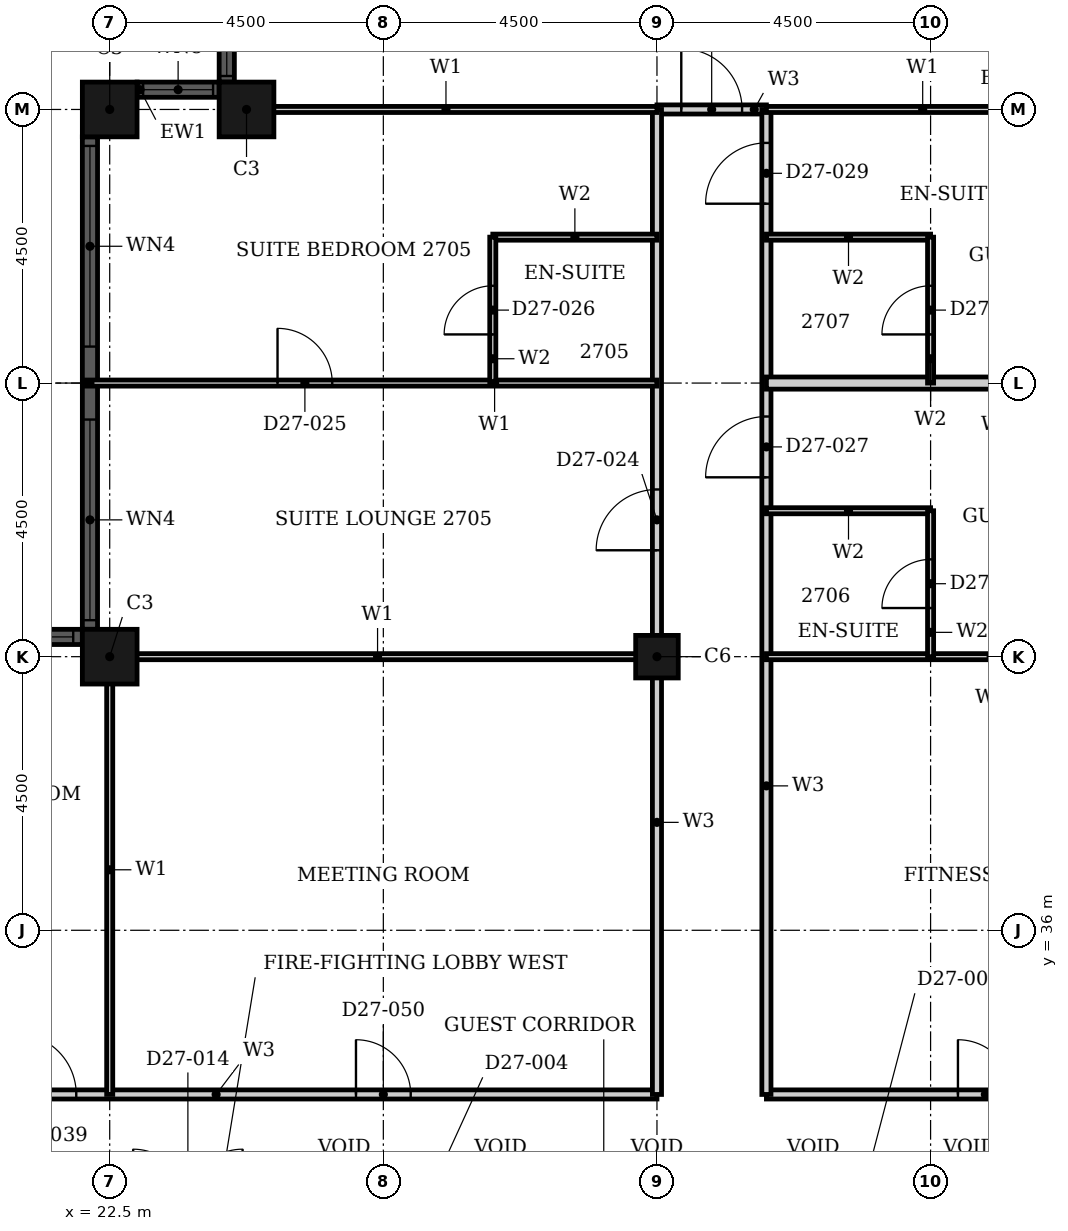
"""IFC4 building model, lengths in metres.
Left out: names, types, materials, properties, quantities, classifications, styles, units other than length and angle.
Written with IfcOpenShell. Run it as: python <this file> out.ifc"""

import sys

from ifc_helpers import new_model, si_unit, direction, frame, frame_2d, origin, origin_2d, place, context, subcontext, project, spatial, rectangle, hollow_rectangle, extrude, element, fill, save


model = new_model("IFC4")
c1 = context("Model", 3, precision=1e-05, world=origin(), true_north=direction((0.0, 1.0)))
c2 = subcontext(c1, "Body", "Model", "MODEL_VIEW")
j1 = project(units=[si_unit("LENGTHUNIT", "METRE"), si_unit("PLANEANGLEUNIT", "RADIAN")], contexts=[c1])
p1 = place(None, origin())
s1 = spatial("IfcSite", under=j1, at=p1, CompositionType="ELEMENT")
p2 = place(p1, origin())
s2 = spatial("IfcBuilding", under=s1, at=p2, CompositionType="ELEMENT")
p3 = place(p2, frame((0.0, 0.0, 111.6)))
s3 = spatial("IfcBuildingStorey", under=s2, at=p3, CompositionType="ELEMENT", Elevation=111.6)
for number, where, z_axis, x_axis in (
    (1, (24.75, 49.5, 0.0), (0.0, 0.0, 1.0), (1.0, 0.0, 0.0)),
    (2, (22.5, 49.5, 0.0), (0.0, 0.0, 1.0), (1.0, 0.0, 0.0)),
    (3, (22.5, 40.5, 0.0), (0.0, 0.0, 1.0), (1.0, 0.0, 0.0)),
):
    element("IfcColumn", number, at=place(p3, frame(where, z_axis=z_axis, x_axis=x_axis)), inside=s3, PredefinedType="COLUMN", context=c2, shape_type="SweptSolid", body=[
        extrude(hollow_rectangle(XDim=0.9, YDim=0.9, WallThickness=0.028, at=origin_2d()), origin(), (0.0, 0.0, 1.0), 3.6),
    ])
p4 = place(p3, frame((31.5, 40.5, 0.0), z_axis=(0.0, 0.0, 1.0), x_axis=(1.0, 0.0, 0.0)))
e4 = element("IfcColumn", 4, at=p4, inside=s3, PredefinedType="COLUMN", context=c2, shape_type="SweptSolid", body=[
    extrude(hollow_rectangle(XDim=0.7, YDim=0.7, WallThickness=0.022, at=origin_2d()), origin(), (0.0, 0.0, 1.0), 3.6),
])
p5 = place(p3, frame((24.425, 51.3, 0.0), z_axis=(0.0, 0.0, 1.0), x_axis=(0.0, -1.0, 0.0)))
e5 = element("IfcWall", 5, at=p5, inside=s3, PredefinedType="SOLIDWALL", context=c2, shape_type="SweptSolid", body=[
    extrude(rectangle(XDim=1.35, YDim=0.25, at=frame_2d((0.675, 0.0))), origin(), (0.0, 0.0, 1.0), 3.6),
])
p6 = place(p5, frame((0.1, 0.0, 0.9)))
e6 = element("IfcOpeningElement", 6, at=p6, cuts=e5, PredefinedType="OPENING", context=c2, shape_type="SweptSolid", body=[
    extrude(rectangle(XDim=1.15, YDim=2.08, at=frame_2d((0.575, 1.04))), frame((0.0, 0.135, 0.0), z_axis=(0.0, -1.0, 0.0), x_axis=(1.0, 0.0, 0.0)), (0.0, 0.0, 1.0), 0.27),
])
p7 = place(p3, frame((24.3, 49.825, 0.0), z_axis=(0.0, 0.0, 1.0), x_axis=(-1.0, 0.0, 0.0)))
e7 = element("IfcWall", 7, at=p7, inside=s3, PredefinedType="SOLIDWALL", context=c2, shape_type="SweptSolid", body=[
    extrude(rectangle(XDim=1.35, YDim=0.25, at=frame_2d((0.675, 0.0))), origin(), (0.0, 0.0, 1.0), 3.6),
])
p8 = place(p7, frame((0.1, 0.0, 0.9)))
e8 = element("IfcOpeningElement", 8, at=p8, cuts=e7, PredefinedType="OPENING", context=c2, shape_type="SweptSolid", body=[
    extrude(rectangle(XDim=1.15, YDim=2.08, at=frame_2d((0.575, 1.04))), frame((0.0, 0.135, 0.0), z_axis=(0.0, -1.0, 0.0), x_axis=(1.0, 0.0, 0.0)), (0.0, 0.0, 1.0), 0.27),
])
p9 = place(p3, frame((22.175, 49.05, 0.0), z_axis=(0.0, 0.0, 1.0), x_axis=(0.0, -1.0, 0.0)))
e9 = element("IfcWall", 9, at=p9, inside=s3, PredefinedType="SOLIDWALL", context=c2, shape_type="SweptSolid", body=[
    extrude(rectangle(XDim=8.1, YDim=0.25, at=frame_2d((4.05, 0.0))), origin(), (0.0, 0.0, 1.0), 3.6),
])
p10 = place(p9, frame((0.15, 0.0, 0.9)))
e10 = element("IfcOpeningElement", 10, at=p10, cuts=e9, PredefinedType="OPENING", context=c2, shape_type="SweptSolid", body=[
    extrude(rectangle(XDim=3.3, YDim=2.08, at=frame_2d((1.65, 1.04))), frame((0.0, 0.135, 0.0), z_axis=(0.0, -1.0, 0.0), x_axis=(1.0, 0.0, 0.0)), (0.0, 0.0, 1.0), 0.27),
])
p11 = place(p9, frame((4.65, 0.0, 0.9)))
e11 = element("IfcOpeningElement", 11, at=p11, cuts=e9, PredefinedType="OPENING", context=c2, shape_type="SweptSolid", body=[
    extrude(rectangle(XDim=3.3, YDim=2.08, at=frame_2d((1.65, 1.04))), frame((0.0, 0.135, 0.0), z_axis=(0.0, -1.0, 0.0), x_axis=(1.0, 0.0, 0.0)), (0.0, 0.0, 1.0), 0.27),
])
p12 = place(p3, frame((22.05, 40.825, 0.0), z_axis=(0.0, 0.0, 1.0), x_axis=(-1.0, 0.0, 0.0)))
e12 = element("IfcWall", 12, at=p12, inside=s3, PredefinedType="SOLIDWALL", context=c2, shape_type="SweptSolid", body=[
    extrude(rectangle(XDim=3.6, YDim=0.25, at=frame_2d((1.8, 0.0))), origin(), (0.0, 0.0, 1.0), 3.6),
])
p13 = place(p12, frame((0.15, 0.0, 0.9)))
e13 = element("IfcOpeningElement", 13, at=p13, cuts=e12, PredefinedType="OPENING", context=c2, shape_type="SweptSolid", body=[
    extrude(rectangle(XDim=3.3, YDim=2.08, at=frame_2d((1.65, 1.04))), frame((0.0, 0.135, 0.0), z_axis=(0.0, -1.0, 0.0), x_axis=(1.0, 0.0, 0.0)), (0.0, 0.0, 1.0), 0.27),
])
p14 = place(p3, frame((33.3, 33.3, 0.0), z_axis=(0.0, 0.0, 1.0), x_axis=(1.0, 0.0, 0.0)))
e14 = element("IfcWall", 14, at=p14, inside=s3, PredefinedType="PARTITIONING", context=c2, shape_type="SweptSolid", body=[
    extrude(rectangle(XDim=11.7, YDim=0.15, at=frame_2d((5.85, 0.0))), origin(), (0.0, 0.0, 1.0), 3.3),
])
p15 = place(p14, frame((10.15, 0.0, 0.0)))
e15 = element("IfcOpeningElement", 15, at=p15, cuts=e14, PredefinedType="OPENING", context=c2, shape_type="SweptSolid", body=[
    extrude(rectangle(XDim=1.0, YDim=2.1, at=frame_2d((0.5, 1.05))), frame((0.0, 0.085, 0.0), z_axis=(0.0, -1.0, 0.0), x_axis=(1.0, 0.0, 0.0)), (0.0, 0.0, 1.0), 0.17),
])
p16 = place(p14, frame((3.15, 0.0, 0.0)))
e16 = element("IfcOpeningElement", 16, at=p16, cuts=e14, PredefinedType="OPENING", context=c2, shape_type="SweptSolid", body=[
    extrude(rectangle(XDim=0.9, YDim=2.1, at=frame_2d((0.45, 1.05))), frame((0.0, 0.085, 0.0), z_axis=(0.0, -1.0, 0.0), x_axis=(1.0, 0.0, 0.0)), (0.0, 0.0, 1.0), 0.17),
])
p17 = place(p3, frame((16.2, 33.3, 0.0), z_axis=(0.0, 0.0, 1.0), x_axis=(1.0, 0.0, 0.0)))
e17 = element("IfcWall", 17, at=p17, inside=s3, PredefinedType="PARTITIONING", context=c2, shape_type="SweptSolid", body=[
    extrude(rectangle(XDim=15.3, YDim=0.15, at=frame_2d((7.65, 0.0))), origin(), (0.0, 0.0, 1.0), 3.3),
])
p18 = place(p17, frame((4.75, 0.0, 0.0)))
e18 = element("IfcOpeningElement", 18, at=p18, cuts=e17, PredefinedType="OPENING", context=c2, shape_type="SweptSolid", body=[
    extrude(rectangle(XDim=1.0, YDim=2.1, at=frame_2d((0.5, 1.05))), frame((0.0, 0.085, 0.0), z_axis=(0.0, -1.0, 0.0), x_axis=(1.0, 0.0, 0.0)), (0.0, 0.0, 1.0), 0.17),
])
p19 = place(p17, frame((0.45, 0.0, 0.0)))
e19 = element("IfcOpeningElement", 19, at=p19, cuts=e17, PredefinedType="OPENING", context=c2, shape_type="SweptSolid", body=[
    extrude(rectangle(XDim=0.9, YDim=2.1, at=frame_2d((0.45, 1.05))), frame((0.0, 0.085, 0.0), z_axis=(0.0, -1.0, 0.0), x_axis=(1.0, 0.0, 0.0)), (0.0, 0.0, 1.0), 0.17),
])
p20 = place(p17, frame((10.35, 0.0, 0.0)))
e20 = element("IfcOpeningElement", 20, at=p20, cuts=e17, PredefinedType="OPENING", context=c2, shape_type="SweptSolid", body=[
    extrude(rectangle(XDim=0.9, YDim=2.1, at=frame_2d((0.45, 1.05))), frame((0.0, 0.085, 0.0), z_axis=(0.0, -1.0, 0.0), x_axis=(1.0, 0.0, 0.0)), (0.0, 0.0, 1.0), 0.17),
])
p21 = place(p3, frame((31.5, 49.5, 0.0), z_axis=(0.0, 0.0, 1.0), x_axis=(1.0, 0.0, 0.0)))
e21 = element("IfcWall", 21, at=p21, inside=s3, PredefinedType="PARTITIONING", context=c2, shape_type="SweptSolid", body=[
    extrude(rectangle(XDim=1.8, YDim=0.15, at=frame_2d((0.9, 0.0))), origin(), (0.0, 0.0, 1.0), 3.3),
])
p22 = place(p21, frame((0.4, 0.0, 0.0)))
e22 = element("IfcOpeningElement", 22, at=p22, cuts=e21, PredefinedType="OPENING", context=c2, shape_type="SweptSolid", body=[
    extrude(rectangle(XDim=1.0, YDim=2.1, at=frame_2d((0.5, 1.05))), frame((0.0, 0.085, 0.0), z_axis=(0.0, -1.0, 0.0), x_axis=(1.0, 0.0, 0.0)), (0.0, 0.0, 1.0), 0.17),
])
p23 = place(p3, frame((31.5, 33.3, 0.0), z_axis=(0.0, 0.0, 1.0), x_axis=(0.0, 1.0, 0.0)))
e23 = element("IfcWall", 23, at=p23, inside=s3, PredefinedType="PARTITIONING", context=c2, shape_type="SweptSolid", body=[
    extrude(rectangle(XDim=16.2, YDim=0.15, at=frame_2d((8.1, 0.0))), origin(), (0.0, 0.0, 1.0), 2.58),
])
p24 = place(p23, frame((8.95, 0.0, 0.0)))
e24 = element("IfcOpeningElement", 24, at=p24, cuts=e23, PredefinedType="OPENING", context=c2, shape_type="SweptSolid", body=[
    extrude(rectangle(XDim=1.0, YDim=2.1, at=frame_2d((0.5, 1.05))), frame((0.0, 0.085, 0.0), z_axis=(0.0, -1.0, 0.0), x_axis=(1.0, 0.0, 0.0)), (0.0, 0.0, 1.0), 0.17),
])
p25 = place(p3, frame((33.3, 33.3, 0.0), z_axis=(0.0, 0.0, 1.0), x_axis=(0.0, 1.0, 0.0)))
e25 = element("IfcWall", 25, at=p25, inside=s3, PredefinedType="PARTITIONING", context=c2, shape_type="SweptSolid", body=[
    extrude(rectangle(XDim=16.2, YDim=0.15, at=frame_2d((8.1, 0.0))), origin(), (0.0, 0.0, 1.0), 3.3),
])
p26 = place(p25, frame((10.15, 0.0, 0.0)))
e26 = element("IfcOpeningElement", 26, at=p26, cuts=e25, PredefinedType="OPENING", context=c2, shape_type="SweptSolid", body=[
    extrude(rectangle(XDim=1.0, YDim=2.1, at=frame_2d((0.5, 1.05))), frame((0.0, 0.085, 0.0), z_axis=(0.0, -1.0, 0.0), x_axis=(1.0, 0.0, 0.0)), (0.0, 0.0, 1.0), 0.17),
])
p27 = place(p25, frame((14.65, 0.0, 0.0)))
e27 = element("IfcOpeningElement", 27, at=p27, cuts=e25, PredefinedType="OPENING", context=c2, shape_type="SweptSolid", body=[
    extrude(rectangle(XDim=1.0, YDim=2.1, at=frame_2d((0.5, 1.05))), frame((0.0, 0.085, 0.0), z_axis=(0.0, -1.0, 0.0), x_axis=(1.0, 0.0, 0.0)), (0.0, 0.0, 1.0), 0.17),
])
p28 = place(p3, frame((33.3, 40.5, 0.0), z_axis=(0.0, 0.0, 1.0), x_axis=(1.0, 0.0, 0.0)))
e28 = element("IfcWall", 28, at=p28, inside=s3, PredefinedType="PARTITIONING", context=c2, shape_type="SweptSolid", body=[
    extrude(rectangle(XDim=7.39, YDim=0.1, at=frame_2d((3.695, 0.0))), origin(), (0.0, 0.0, 1.0), 2.38),
])
p29 = place(p3, frame((22.31, 40.5, 0.0), z_axis=(0.0, 0.0, 1.0), x_axis=(1.0, 0.0, 0.0)))
e29 = element("IfcWall", 29, at=p29, inside=s3, PredefinedType="PARTITIONING", context=c2, shape_type="SweptSolid", body=[
    extrude(rectangle(XDim=9.19, YDim=0.1, at=frame_2d((4.595, 0.0))), origin(), (0.0, 0.0, 1.0), 2.38),
])
p30 = place(p3, frame((22.11, 45.0, 0.0), z_axis=(0.0, 0.0, 1.0), x_axis=(1.0, 0.0, 0.0)))
e30 = element("IfcWall", 30, at=p30, inside=s3, PredefinedType="PARTITIONING", context=c2, shape_type="SweptSolid", body=[
    extrude(rectangle(XDim=9.39, YDim=0.1, at=frame_2d((4.695, 0.0))), origin(), (0.0, 0.0, 1.0), 3.3),
])
p31 = place(p30, frame((3.15, 0.0, 0.0)))
e31 = element("IfcOpeningElement", 31, at=p31, cuts=e30, PredefinedType="OPENING", context=c2, shape_type="SweptSolid", body=[
    extrude(rectangle(XDim=0.9, YDim=2.1, at=frame_2d((0.45, 1.05))), frame((0.0, 0.06, 0.0), z_axis=(0.0, -1.0, 0.0), x_axis=(1.0, 0.0, 0.0)), (0.0, 0.0, 1.0), 0.12),
])
p32 = place(p3, frame((33.3, 49.5, 0.0), z_axis=(0.0, 0.0, 1.0), x_axis=(1.0, 0.0, 0.0)))
e32 = element("IfcWall", 32, at=p32, inside=s3, PredefinedType="PARTITIONING", context=c2, shape_type="SweptSolid", body=[
    extrude(rectangle(XDim=5.14, YDim=0.1, at=frame_2d((2.57, 0.0))), origin(), (0.0, 0.0, 1.0), 3.3),
])
p33 = place(p3, frame((24.56, 49.5, 0.0), z_axis=(0.0, 0.0, 1.0), x_axis=(1.0, 0.0, 0.0)))
e33 = element("IfcWall", 33, at=p33, inside=s3, PredefinedType="PARTITIONING", context=c2, shape_type="SweptSolid", body=[
    extrude(rectangle(XDim=6.94, YDim=0.1, at=frame_2d((3.47, 0.0))), origin(), (0.0, 0.0, 1.0), 3.3),
])
p34 = place(p3, frame((22.5, 33.3, 0.0), z_axis=(0.0, 0.0, 1.0), x_axis=(0.0, 1.0, 0.0)))
e34 = element("IfcWall", 34, at=p34, inside=s3, PredefinedType="PARTITIONING", context=c2, shape_type="SweptSolid", body=[
    extrude(rectangle(XDim=7.39, YDim=0.1, at=frame_2d((3.695, 0.0))), origin(), (0.0, 0.0, 1.0), 3.3),
])
p35 = place(p3, frame((33.3, 45.0, 0.0), z_axis=(0.0, 0.0, 1.0), x_axis=(1.0, 0.0, 0.0)))
e35 = element("IfcWall", 35, at=p35, inside=s3, PredefinedType="PARTITIONING", context=c2, shape_type="SweptSolid", body=[
    extrude(rectangle(XDim=7.59, YDim=0.2, at=frame_2d((3.795, 0.0))), origin(), (0.0, 0.0, 1.0), 3.3),
])
for number, where, z_axis, x_axis in (
    (36, (33.3, 42.9, 0.0), (0.0, 0.0, 1.0), (1.0, 0.0, 0.0)),
    (37, (33.3, 47.4, 0.0), (0.0, 0.0, 1.0), (1.0, 0.0, 0.0)),
    (38, (28.8, 47.4, 0.0), (0.0, 0.0, 1.0), (1.0, 0.0, 0.0)),
):
    element("IfcWall", number, at=place(p3, frame(where, z_axis=z_axis, x_axis=x_axis)), inside=s3, PredefinedType="PARTITIONING", context=c2, shape_type="SweptSolid", body=[
        extrude(rectangle(XDim=2.7, YDim=0.1, at=frame_2d((1.35, 0.0))), origin(), (0.0, 0.0, 1.0), 3.3),
    ])
p36 = place(p3, frame((28.8, 45.0, 0.0), z_axis=(0.0, 0.0, 1.0), x_axis=(0.0, 1.0, 0.0)))
e39 = element("IfcWall", 39, at=p36, inside=s3, PredefinedType="PARTITIONING", context=c2, shape_type="SweptSolid", body=[
    extrude(rectangle(XDim=2.4, YDim=0.1, at=frame_2d((1.2, 0.0))), origin(), (0.0, 0.0, 1.0), 3.3),
])
p37 = place(p36, frame((0.8, 0.0, 0.0)))
e40 = element("IfcOpeningElement", 40, at=p37, cuts=e39, PredefinedType="OPENING", context=c2, shape_type="SweptSolid", body=[
    extrude(rectangle(XDim=0.8, YDim=2.1, at=frame_2d((0.4, 1.05))), frame((0.0, 0.06, 0.0), z_axis=(0.0, -1.0, 0.0), x_axis=(1.0, 0.0, 0.0)), (0.0, 0.0, 1.0), 0.12),
])
p38 = place(p3, frame((36.0, 40.5, 0.0), z_axis=(0.0, 0.0, 1.0), x_axis=(0.0, 1.0, 0.0)))
e41 = element("IfcWall", 41, at=p38, inside=s3, PredefinedType="PARTITIONING", context=c2, shape_type="SweptSolid", body=[
    extrude(rectangle(XDim=2.4, YDim=0.1, at=frame_2d((1.2, 0.0))), origin(), (0.0, 0.0, 1.0), 2.58),
])
p39 = place(p38, frame((0.8, 0.0, 0.0)))
e42 = element("IfcOpeningElement", 42, at=p39, cuts=e41, PredefinedType="OPENING", context=c2, shape_type="SweptSolid", body=[
    extrude(rectangle(XDim=0.8, YDim=2.1, at=frame_2d((0.4, 1.05))), frame((0.0, 0.06, 0.0), z_axis=(0.0, -1.0, 0.0), x_axis=(1.0, 0.0, 0.0)), (0.0, 0.0, 1.0), 0.12),
])
p40 = place(p3, frame((36.0, 45.0, 0.0), z_axis=(0.0, 0.0, 1.0), x_axis=(0.0, 1.0, 0.0)))
e43 = element("IfcWall", 43, at=p40, inside=s3, PredefinedType="PARTITIONING", context=c2, shape_type="SweptSolid", body=[
    extrude(rectangle(XDim=2.4, YDim=0.1, at=frame_2d((1.2, 0.0))), origin(), (0.0, 0.0, 1.0), 2.58),
])
p41 = place(p40, frame((0.8, 0.0, 0.0)))
e44 = element("IfcOpeningElement", 44, at=p41, cuts=e43, PredefinedType="OPENING", context=c2, shape_type="SweptSolid", body=[
    extrude(rectangle(XDim=0.8, YDim=2.1, at=frame_2d((0.4, 1.05))), frame((0.0, 0.06, 0.0), z_axis=(0.0, -1.0, 0.0), x_axis=(1.0, 0.0, 0.0)), (0.0, 0.0, 1.0), 0.12),
])
p42 = place(p6, origin())
e45 = element("IfcWindow", 45, at=p42, inside=s3, PartitioningType="SINGLE_PANEL", PredefinedType="WINDOW", context=c2, shape_type="SweptSolid", body=[
    extrude(rectangle(XDim=1.15, YDim=2.08, at=frame_2d((0.575, 1.04))), frame((0.0, 0.03, 0.0), z_axis=(0.0, -1.0, 0.0), x_axis=(1.0, 0.0, 0.0)), (0.0, 0.0, 1.0), 0.06),
])
fill(e6, e45)
p43 = place(p8, origin())
e46 = element("IfcWindow", 46, at=p43, inside=s3, PartitioningType="SINGLE_PANEL", PredefinedType="WINDOW", context=c2, shape_type="SweptSolid", body=[
    extrude(rectangle(XDim=1.15, YDim=2.08, at=frame_2d((0.575, 1.04))), frame((0.0, 0.03, 0.0), z_axis=(0.0, -1.0, 0.0), x_axis=(1.0, 0.0, 0.0)), (0.0, 0.0, 1.0), 0.06),
])
fill(e8, e46)
p44 = place(p10, origin())
e47 = element("IfcWindow", 47, at=p44, inside=s3, PartitioningType="SINGLE_PANEL", PredefinedType="WINDOW", context=c2, shape_type="SweptSolid", body=[
    extrude(rectangle(XDim=3.3, YDim=2.08, at=frame_2d((1.65, 1.04))), frame((0.0, 0.03, 0.0), z_axis=(0.0, -1.0, 0.0), x_axis=(1.0, 0.0, 0.0)), (0.0, 0.0, 1.0), 0.06),
])
fill(e10, e47)
p45 = place(p11, origin())
e48 = element("IfcWindow", 48, at=p45, inside=s3, PartitioningType="SINGLE_PANEL", PredefinedType="WINDOW", context=c2, shape_type="SweptSolid", body=[
    extrude(rectangle(XDim=3.3, YDim=2.08, at=frame_2d((1.65, 1.04))), frame((0.0, 0.03, 0.0), z_axis=(0.0, -1.0, 0.0), x_axis=(1.0, 0.0, 0.0)), (0.0, 0.0, 1.0), 0.06),
])
fill(e11, e48)
p46 = place(p13, origin())
e49 = element("IfcWindow", 49, at=p46, inside=s3, PartitioningType="SINGLE_PANEL", PredefinedType="WINDOW", context=c2, shape_type="SweptSolid", body=[
    extrude(rectangle(XDim=3.3, YDim=2.08, at=frame_2d((1.65, 1.04))), frame((0.0, 0.03, 0.0), z_axis=(0.0, -1.0, 0.0), x_axis=(1.0, 0.0, 0.0)), (0.0, 0.0, 1.0), 0.06),
])
fill(e13, e49)
p47 = place(p24, origin())
e50 = element("IfcDoor", 50, at=p47, inside=s3, OperationType="SINGLE_SWING_LEFT", PredefinedType="DOOR", context=c2, shape_type="SweptSolid", body=[
    extrude(rectangle(XDim=1.0, YDim=2.1, at=frame_2d((0.5, 1.05))), frame((0.0, 0.025, 0.0), z_axis=(0.0, -1.0, 0.0), x_axis=(1.0, 0.0, 0.0)), (0.0, 0.0, 1.0), 0.05),
])
fill(e24, e50)
p48 = place(p31, origin())
e51 = element("IfcDoor", 51, at=p48, inside=s3, OperationType="SINGLE_SWING_LEFT", PredefinedType="DOOR", context=c2, shape_type="SweptSolid", body=[
    extrude(rectangle(XDim=0.9, YDim=2.1, at=frame_2d((0.45, 1.05))), frame((0.0, 0.025, 0.0), z_axis=(0.0, -1.0, 0.0), x_axis=(1.0, 0.0, 0.0)), (0.0, 0.0, 1.0), 0.05),
])
fill(e31, e51)
p49 = place(p37, origin())
e52 = element("IfcDoor", 52, at=p49, inside=s3, OperationType="SINGLE_SWING_LEFT", PredefinedType="DOOR", context=c2, shape_type="SweptSolid", body=[
    extrude(rectangle(XDim=0.8, YDim=2.1, at=frame_2d((0.4, 1.05))), frame((0.0, 0.025, 0.0), z_axis=(0.0, -1.0, 0.0), x_axis=(1.0, 0.0, 0.0)), (0.0, 0.0, 1.0), 0.05),
])
fill(e40, e52)
p50 = place(p26, origin())
e53 = element("IfcDoor", 53, at=p50, inside=s3, OperationType="SINGLE_SWING_RIGHT", PredefinedType="DOOR", context=c2, shape_type="SweptSolid", body=[
    extrude(rectangle(XDim=1.0, YDim=2.1, at=frame_2d((0.5, 1.05))), frame((0.0, 0.025, 0.0), z_axis=(0.0, -1.0, 0.0), x_axis=(1.0, 0.0, 0.0)), (0.0, 0.0, 1.0), 0.05),
])
fill(e26, e53)
p51 = place(p39, origin())
e54 = element("IfcDoor", 54, at=p51, inside=s3, OperationType="SINGLE_SWING_LEFT", PredefinedType="DOOR", context=c2, shape_type="SweptSolid", body=[
    extrude(rectangle(XDim=0.8, YDim=2.1, at=frame_2d((0.4, 1.05))), frame((0.0, 0.025, 0.0), z_axis=(0.0, -1.0, 0.0), x_axis=(1.0, 0.0, 0.0)), (0.0, 0.0, 1.0), 0.05),
])
fill(e42, e54)
p52 = place(p27, origin())
e55 = element("IfcDoor", 55, at=p52, inside=s3, OperationType="SINGLE_SWING_RIGHT", PredefinedType="DOOR", context=c2, shape_type="SweptSolid", body=[
    extrude(rectangle(XDim=1.0, YDim=2.1, at=frame_2d((0.5, 1.05))), frame((0.0, 0.025, 0.0), z_axis=(0.0, -1.0, 0.0), x_axis=(1.0, 0.0, 0.0)), (0.0, 0.0, 1.0), 0.05),
])
fill(e27, e55)
p53 = place(p41, origin())
e56 = element("IfcDoor", 56, at=p53, inside=s3, OperationType="SINGLE_SWING_RIGHT", PredefinedType="DOOR", context=c2, shape_type="SweptSolid", body=[
    extrude(rectangle(XDim=0.8, YDim=2.1, at=frame_2d((0.4, 1.05))), frame((0.0, 0.025, 0.0), z_axis=(0.0, -1.0, 0.0), x_axis=(1.0, 0.0, 0.0)), (0.0, 0.0, 1.0), 0.05),
])
fill(e44, e56)
p54 = place(p22, origin())
e57 = element("IfcDoor", 57, at=p54, inside=s3, OperationType="SINGLE_SWING_LEFT", PredefinedType="DOOR", context=c2, shape_type="SweptSolid", body=[
    extrude(rectangle(XDim=1.0, YDim=2.1, at=frame_2d((0.5, 1.05))), frame((0.0, 0.025, 0.0), z_axis=(0.0, -1.0, 0.0), x_axis=(1.0, 0.0, 0.0)), (0.0, 0.0, 1.0), 0.05),
])
fill(e22, e57)
p55 = place(p18, origin())
e58 = element("IfcDoor", 58, at=p55, inside=s3, OperationType="SINGLE_SWING_RIGHT", PredefinedType="DOOR", context=c2, shape_type="SweptSolid", body=[
    extrude(rectangle(XDim=1.0, YDim=2.1, at=frame_2d((0.5, 1.05))), frame((0.0, 0.025, 0.0), z_axis=(0.0, -1.0, 0.0), x_axis=(1.0, 0.0, 0.0)), (0.0, 0.0, 1.0), 0.05),
])
fill(e18, e58)
p56 = place(p20, origin())
e59 = element("IfcDoor", 59, at=p56, inside=s3, OperationType="SINGLE_SWING_LEFT", PredefinedType="DOOR", context=c2, shape_type="SweptSolid", body=[
    extrude(rectangle(XDim=0.9, YDim=2.1, at=frame_2d((0.45, 1.05))), frame((0.0, 0.025, 0.0), z_axis=(0.0, -1.0, 0.0), x_axis=(1.0, 0.0, 0.0)), (0.0, 0.0, 1.0), 0.05),
])
fill(e20, e59)
p57 = place(p16, origin())
e60 = element("IfcDoor", 60, at=p57, inside=s3, OperationType="SINGLE_SWING_RIGHT", PredefinedType="DOOR", context=c2, shape_type="SweptSolid", body=[
    extrude(rectangle(XDim=0.9, YDim=2.1, at=frame_2d((0.45, 1.05))), frame((0.0, 0.025, 0.0), z_axis=(0.0, -1.0, 0.0), x_axis=(1.0, 0.0, 0.0)), (0.0, 0.0, 1.0), 0.05),
])
fill(e16, e60)
save(model, sys.argv[1])
